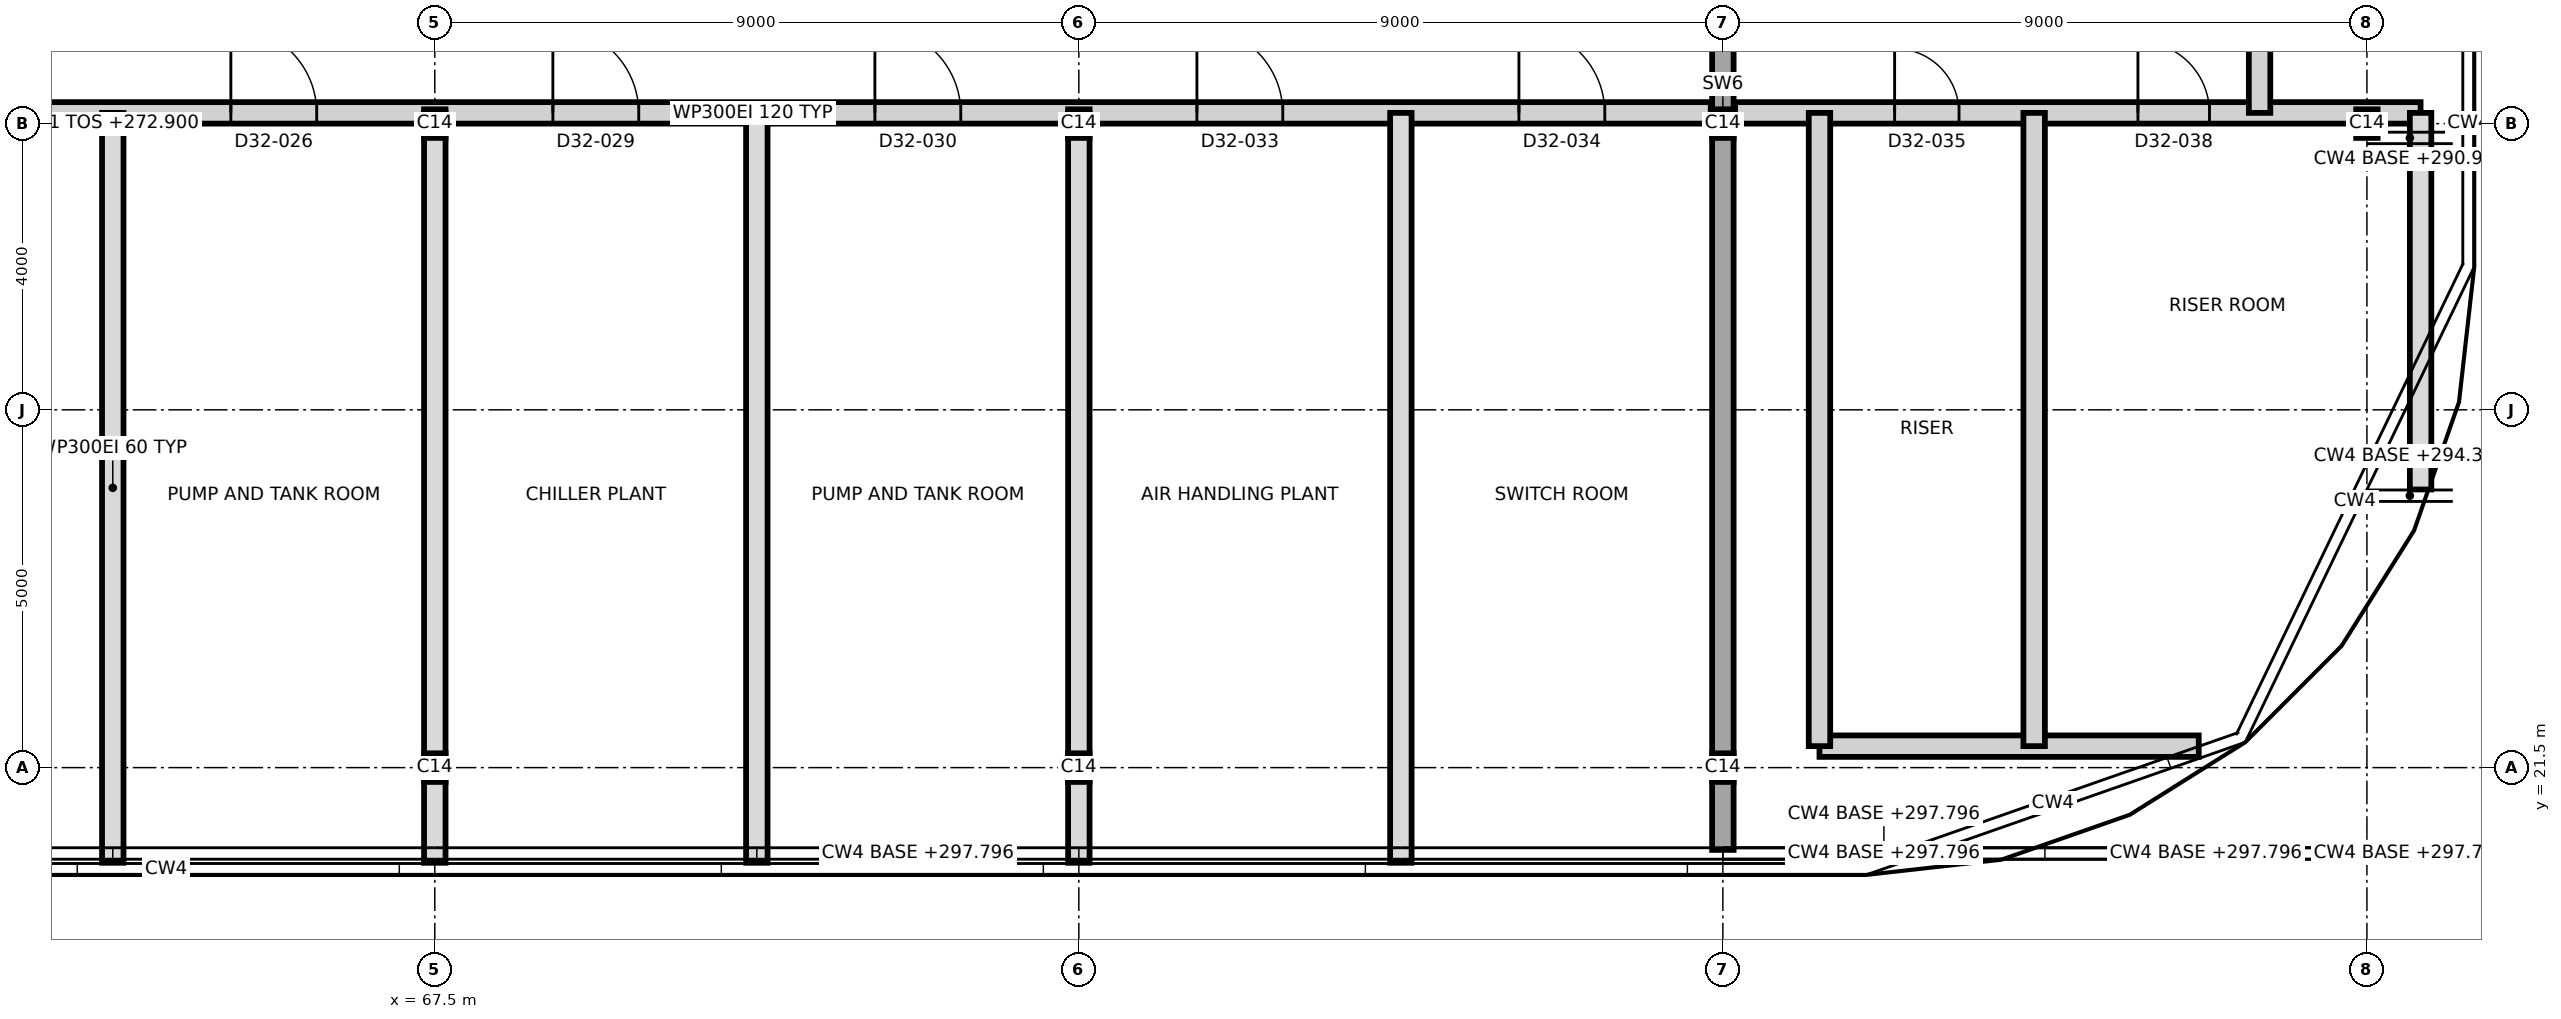
"""IFC4 building model, lengths in metres.
Left out: names, types, materials, properties, quantities, classifications, styles, units other than length and angle.
Written with IfcOpenShell. Run it as: python <this file> out.ifc"""

import sys

from ifc_helpers import new_model, si_unit, direction, frame, frame_2d, origin, origin_2d, place, context, subcontext, project, spatial, rectangle, i_section, extrude, element, fill, save


model = new_model("IFC4")
c1 = context("Model", 3, precision=1e-05, world=origin(), true_north=direction((0.0, 1.0)))
c2 = subcontext(c1, "Body", "Model", "MODEL_VIEW")
j1 = project(units=[si_unit("LENGTHUNIT", "METRE"), si_unit("PLANEANGLEUNIT", "RADIAN")], contexts=[c1])
p1 = place(None, origin())
s1 = spatial("IfcSite", under=j1, at=p1, CompositionType="ELEMENT")
p2 = place(p1, origin())
s2 = spatial("IfcBuilding", under=s1, at=p2, CompositionType="ELEMENT")
p3 = place(p2, frame((0.0, 0.0, 272.9)))
s3 = spatial("IfcBuildingStorey", under=s2, at=p3, CompositionType="ELEMENT", Elevation=272.9)
p4 = place(p3, frame((85.5, 20.35, 0.0), z_axis=(0.0, 0.0, 1.0), x_axis=(0.0, 1.0, 0.0)))
e1 = element("IfcWall", 1, at=p4, inside=s3, PredefinedType="SHEAR", context=c2, shape_type="SweptSolid", body=[
    extrude(rectangle(XDim=20.3, YDim=0.3, at=frame_2d((10.15, 0.0))), origin(), (0.0, 0.0, 1.0), 4.2),
])
p5 = place(p4, frame((11.35, 0.0, 0.0)))
e2 = element("IfcOpeningElement", 2, at=p5, cuts=e1, PredefinedType="OPENING", context=c2, shape_type="SweptSolid", body=[
    extrude(rectangle(XDim=1.4, YDim=2.1, at=frame_2d((0.7, 1.05))), frame((0.0, 0.16, 0.0), z_axis=(0.0, -1.0, 0.0), x_axis=(1.0, 0.0, 0.0)), (0.0, 0.0, 1.0), 0.32),
])
for number, where, z_axis, x_axis in (
    (3, (67.5, 21.5, 0.0), (0.0, 0.0, 1.0), (1.0, 0.0, 0.0)),
    (4, (67.5, 30.5, 0.0), (0.0, 0.0, 1.0), (1.0, 0.0, 0.0)),
    (5, (76.5, 21.5, 0.0), (0.0, 0.0, 1.0), (1.0, 0.0, 0.0)),
    (6, (76.5, 30.5, 0.0), (0.0, 0.0, 1.0), (1.0, 0.0, 0.0)),
    (7, (85.5, 21.5, 0.0), (0.0, 0.0, 1.0), (1.0, 0.0, 0.0)),
    (8, (85.5, 30.5, 0.0), (0.0, 0.0, 1.0), (1.0, 0.0, 0.0)),
    (9, (94.5, 30.5, 0.0), (0.0, 0.0, 1.0), (1.0, 0.0, 0.0)),
):
    element("IfcColumn", number, at=place(p3, frame(where, z_axis=z_axis, x_axis=x_axis)), inside=s3, PredefinedType="COLUMN", context=c2, shape_type="SweptSolid", body=[
        extrude(i_section(OverallWidth=0.3, OverallDepth=0.4, WebThickness=0.013, FlangeThickness=0.024, FilletRadius=0.027, at=origin_2d()), origin(), (0.0, 0.0, 1.0), 4.2),
    ])
p6 = place(p3, frame((86.85, 21.8, 0.0), z_axis=(0.0, 0.0, 1.0), x_axis=(1.0, 0.0, 0.0)))
e10 = element("IfcWall", 10, at=p6, inside=s3, PredefinedType="PARTITIONING", context=c2, shape_type="SweptSolid", body=[
    extrude(rectangle(XDim=5.3, YDim=0.3, at=frame_2d((2.65, 0.0))), origin(), (0.0, 0.0, 1.0), 3.9),
])
p7 = place(p3, frame((58.55, 30.65, 0.0), z_axis=(0.0, 0.0, 1.0), x_axis=(1.0, 0.0, 0.0)))
e11 = element("IfcWall", 11, at=p7, inside=s3, PredefinedType="PARTITIONING", context=c2, shape_type="SweptSolid", body=[
    extrude(rectangle(XDim=26.78, YDim=0.3, at=frame_2d((13.39, 0.0))), origin(), (0.0, 0.0, 1.0), 3.9),
])
p8 = place(p7, frame((1.6, 0.0, 0.0)))
e12 = element("IfcOpeningElement", 12, at=p8, cuts=e11, PredefinedType="OPENING", context=c2, shape_type="SweptSolid", body=[
    extrude(rectangle(XDim=1.2, YDim=2.1, at=frame_2d((0.6, 1.05))), frame((0.0, 0.16, 0.0), z_axis=(0.0, -1.0, 0.0), x_axis=(1.0, 0.0, 0.0)), (0.0, 0.0, 1.0), 0.32),
])
p9 = place(p7, frame((6.1, 0.0, 0.0)))
e13 = element("IfcOpeningElement", 13, at=p9, cuts=e11, PredefinedType="OPENING", context=c2, shape_type="SweptSolid", body=[
    extrude(rectangle(XDim=1.2, YDim=2.1, at=frame_2d((0.6, 1.05))), frame((0.0, 0.16, 0.0), z_axis=(0.0, -1.0, 0.0), x_axis=(1.0, 0.0, 0.0)), (0.0, 0.0, 1.0), 0.32),
])
p10 = place(p7, frame((10.6, 0.0, 0.0)))
e14 = element("IfcOpeningElement", 14, at=p10, cuts=e11, PredefinedType="OPENING", context=c2, shape_type="SweptSolid", body=[
    extrude(rectangle(XDim=1.2, YDim=2.1, at=frame_2d((0.6, 1.05))), frame((0.0, 0.16, 0.0), z_axis=(0.0, -1.0, 0.0), x_axis=(1.0, 0.0, 0.0)), (0.0, 0.0, 1.0), 0.32),
])
p11 = place(p7, frame((15.1, 0.0, 0.0)))
e15 = element("IfcOpeningElement", 15, at=p11, cuts=e11, PredefinedType="OPENING", context=c2, shape_type="SweptSolid", body=[
    extrude(rectangle(XDim=1.2, YDim=2.1, at=frame_2d((0.6, 1.05))), frame((0.0, 0.16, 0.0), z_axis=(0.0, -1.0, 0.0), x_axis=(1.0, 0.0, 0.0)), (0.0, 0.0, 1.0), 0.32),
])
p12 = place(p7, frame((19.6, 0.0, 0.0)))
e16 = element("IfcOpeningElement", 16, at=p12, cuts=e11, PredefinedType="OPENING", context=c2, shape_type="SweptSolid", body=[
    extrude(rectangle(XDim=1.2, YDim=2.1, at=frame_2d((0.6, 1.05))), frame((0.0, 0.16, 0.0), z_axis=(0.0, -1.0, 0.0), x_axis=(1.0, 0.0, 0.0)), (0.0, 0.0, 1.0), 0.32),
])
p13 = place(p7, frame((24.1, 0.0, 0.0)))
e17 = element("IfcOpeningElement", 17, at=p13, cuts=e11, PredefinedType="OPENING", context=c2, shape_type="SweptSolid", body=[
    extrude(rectangle(XDim=1.2, YDim=2.1, at=frame_2d((0.6, 1.05))), frame((0.0, 0.16, 0.0), z_axis=(0.0, -1.0, 0.0), x_axis=(1.0, 0.0, 0.0)), (0.0, 0.0, 1.0), 0.32),
])
p14 = place(p3, frame((85.67, 30.65, 0.0), z_axis=(0.0, 0.0, 1.0), x_axis=(1.0, 0.0, 0.0)))
e18 = element("IfcWall", 18, at=p14, inside=s3, PredefinedType="PARTITIONING", context=c2, shape_type="SweptSolid", body=[
    extrude(rectangle(XDim=9.58, YDim=0.3, at=frame_2d((4.79, 0.0))), origin(), (0.0, 0.0, 1.0), 3.9),
])
p15 = place(p14, frame((2.23, 0.0, 0.0)))
e19 = element("IfcOpeningElement", 19, at=p15, cuts=e18, PredefinedType="OPENING", context=c2, shape_type="SweptSolid", body=[
    extrude(rectangle(XDim=0.9, YDim=2.1, at=frame_2d((0.45, 1.05))), frame((0.0, 0.16, 0.0), z_axis=(0.0, -1.0, 0.0), x_axis=(1.0, 0.0, 0.0)), (0.0, 0.0, 1.0), 0.32),
])
p16 = place(p14, frame((5.63, 0.0, 0.0)))
e20 = element("IfcOpeningElement", 20, at=p16, cuts=e18, PredefinedType="OPENING", context=c2, shape_type="SweptSolid", body=[
    extrude(rectangle(XDim=1.0, YDim=2.1, at=frame_2d((0.5, 1.05))), frame((0.0, 0.16, 0.0), z_axis=(0.0, -1.0, 0.0), x_axis=(1.0, 0.0, 0.0)), (0.0, 0.0, 1.0), 0.32),
])
for number, where, z_axis, x_axis in (
    (21, (63.0, 20.17, 0.0), (0.0, 0.0, 1.0), (0.0, 1.0, 0.0)),
    (22, (67.5, 20.17, 0.0), (0.0, 0.0, 1.0), (0.0, 1.0, 0.0)),
    (23, (72.0, 20.17, 0.0), (0.0, 0.0, 1.0), (0.0, 1.0, 0.0)),
    (24, (76.5, 20.17, 0.0), (0.0, 0.0, 1.0), (0.0, 1.0, 0.0)),
    (25, (81.0, 20.17, 0.0), (0.0, 0.0, 1.0), (0.0, 1.0, 0.0)),
):
    element("IfcWall", number, at=place(p3, frame(where, z_axis=z_axis, x_axis=x_axis)), inside=s3, PredefinedType="PARTITIONING", context=c2, shape_type="SweptSolid", body=[
        extrude(rectangle(XDim=10.48, YDim=0.3, at=frame_2d((5.24, 0.0))), origin(), (0.0, 0.0, 1.0), 3.9),
    ])
for number, where, z_axis, x_axis in (
    (26, (86.85, 21.8, 0.0), (0.0, 0.0, 1.0), (0.0, 1.0, 0.0)),
    (27, (89.85, 21.8, 0.0), (0.0, 0.0, 1.0), (0.0, 1.0, 0.0)),
):
    element("IfcWall", number, at=place(p3, frame(where, z_axis=z_axis, x_axis=x_axis)), inside=s3, PredefinedType="PARTITIONING", context=c2, shape_type="SweptSolid", body=[
        extrude(rectangle(XDim=8.85, YDim=0.3, at=frame_2d((4.425, 0.0))), origin(), (0.0, 0.0, 1.0), 3.9),
    ])
p17 = place(p3, frame((93.0, 30.65, 0.0), z_axis=(0.0, 0.0, 1.0), x_axis=(0.0, 1.0, 0.0)))
e28 = element("IfcWall", 28, at=p17, inside=s3, PredefinedType="PARTITIONING", context=c2, shape_type="SweptSolid", body=[
    extrude(rectangle(XDim=2.7, YDim=0.3, at=frame_2d((1.35, 0.0))), origin(), (0.0, 0.0, 1.0), 3.9),
])
p18 = place(p3, frame((95.25, 25.387, 0.0), z_axis=(0.0, 0.0, 1.0), x_axis=(0.0, 1.0, 0.0)))
e29 = element("IfcWall", 29, at=p18, inside=s3, PredefinedType="PARTITIONING", context=c2, shape_type="SweptSolid", body=[
    extrude(rectangle(XDim=5.263, YDim=0.3, at=frame_2d((2.631, 0.0))), origin(), (0.0, 0.0, 1.0), 3.9),
])
p19 = place(p9, origin())
e30 = element("IfcDoor", 30, at=p19, inside=s3, OperationType="SINGLE_SWING_LEFT", PredefinedType="DOOR", context=c2, shape_type="SweptSolid", body=[
    extrude(rectangle(XDim=1.2, YDim=2.1, at=frame_2d((0.6, 1.05))), frame((0.0, 0.025, 0.0), z_axis=(0.0, -1.0, 0.0), x_axis=(1.0, 0.0, 0.0)), (0.0, 0.0, 1.0), 0.05),
])
fill(e13, e30)
p20 = place(p10, origin())
e31 = element("IfcDoor", 31, at=p20, inside=s3, OperationType="SINGLE_SWING_LEFT", PredefinedType="DOOR", context=c2, shape_type="SweptSolid", body=[
    extrude(rectangle(XDim=1.2, YDim=2.1, at=frame_2d((0.6, 1.05))), frame((0.0, 0.025, 0.0), z_axis=(0.0, -1.0, 0.0), x_axis=(1.0, 0.0, 0.0)), (0.0, 0.0, 1.0), 0.05),
])
fill(e14, e31)
p21 = place(p11, origin())
e32 = element("IfcDoor", 32, at=p21, inside=s3, OperationType="SINGLE_SWING_LEFT", PredefinedType="DOOR", context=c2, shape_type="SweptSolid", body=[
    extrude(rectangle(XDim=1.2, YDim=2.1, at=frame_2d((0.6, 1.05))), frame((0.0, 0.025, 0.0), z_axis=(0.0, -1.0, 0.0), x_axis=(1.0, 0.0, 0.0)), (0.0, 0.0, 1.0), 0.05),
])
fill(e15, e32)
p22 = place(p12, origin())
e33 = element("IfcDoor", 33, at=p22, inside=s3, OperationType="SINGLE_SWING_LEFT", PredefinedType="DOOR", context=c2, shape_type="SweptSolid", body=[
    extrude(rectangle(XDim=1.2, YDim=2.1, at=frame_2d((0.6, 1.05))), frame((0.0, 0.025, 0.0), z_axis=(0.0, -1.0, 0.0), x_axis=(1.0, 0.0, 0.0)), (0.0, 0.0, 1.0), 0.05),
])
fill(e16, e33)
p23 = place(p13, origin())
e34 = element("IfcDoor", 34, at=p23, inside=s3, OperationType="SINGLE_SWING_RIGHT", PredefinedType="DOOR", context=c2, shape_type="SweptSolid", body=[
    extrude(rectangle(XDim=1.2, YDim=2.1, at=frame_2d((0.6, 1.05))), frame((0.0, 0.025, 0.0), z_axis=(0.0, -1.0, 0.0), x_axis=(1.0, 0.0, 0.0)), (0.0, 0.0, 1.0), 0.05),
])
fill(e17, e34)
p24 = place(p15, origin())
e35 = element("IfcDoor", 35, at=p24, inside=s3, OperationType="SINGLE_SWING_LEFT", PredefinedType="DOOR", context=c2, shape_type="SweptSolid", body=[
    extrude(rectangle(XDim=0.9, YDim=2.1, at=frame_2d((0.45, 1.05))), frame((0.0, 0.025, 0.0), z_axis=(0.0, -1.0, 0.0), x_axis=(1.0, 0.0, 0.0)), (0.0, 0.0, 1.0), 0.05),
])
fill(e19, e35)
p25 = place(p16, origin())
e36 = element("IfcDoor", 36, at=p25, inside=s3, OperationType="SINGLE_SWING_LEFT", PredefinedType="DOOR", context=c2, shape_type="SweptSolid", body=[
    extrude(rectangle(XDim=1.0, YDim=2.1, at=frame_2d((0.5, 1.05))), frame((0.0, 0.025, 0.0), z_axis=(0.0, -1.0, 0.0), x_axis=(1.0, 0.0, 0.0)), (0.0, 0.0, 1.0), 0.05),
])
fill(e20, e36)
save(model, sys.argv[1])
